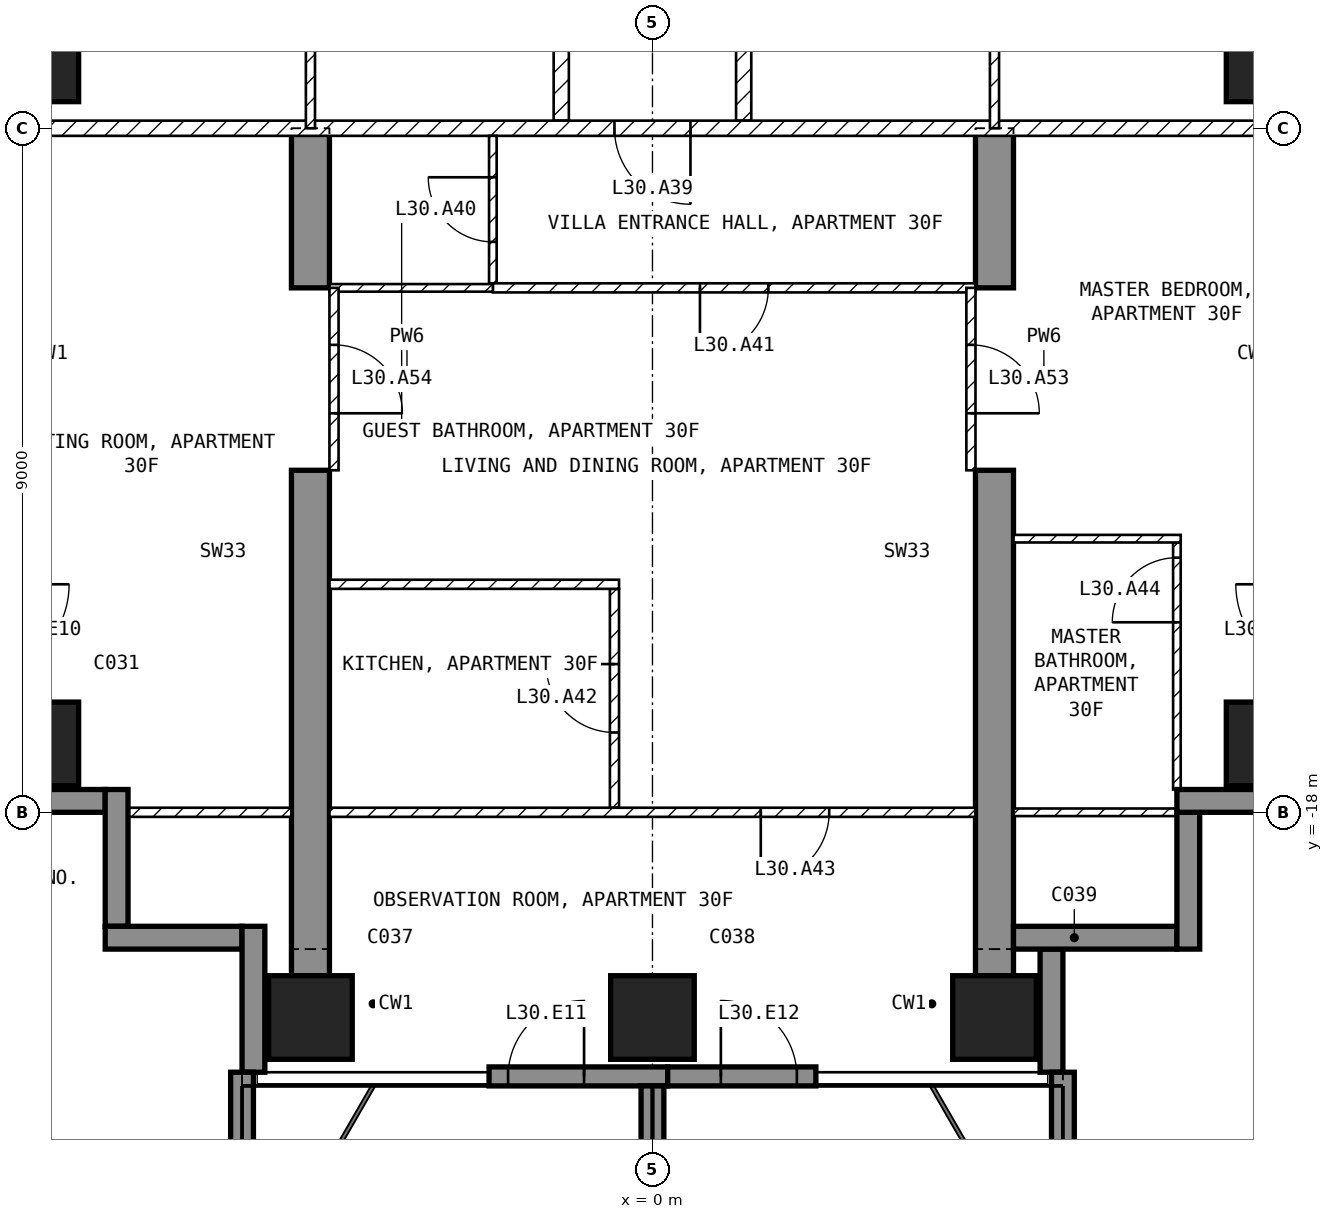
"""IFC4 building model, lengths in metres.
Left out: names, types, materials, properties, quantities, classifications, styles, units other than length and angle.
Written with IfcOpenShell. Run it as: python <this file> out.ifc"""

import sys

from ifc_helpers import new_model, si_unit, direction, frame, frame_2d, origin, origin_2d, place, context, subcontext, project, spatial, polyline, rectangle, outline, extrude, element, fill, save


model = new_model("IFC4")
c1 = context("Model", 3, precision=1e-05, world=origin(), true_north=direction((0.0, 1.0)))
c2 = subcontext(c1, "Body", "Model", "MODEL_VIEW")
j1 = project(units=[si_unit("LENGTHUNIT", "METRE"), si_unit("PLANEANGLEUNIT", "RADIAN")], contexts=[c1])
p1 = place(None, origin())
s1 = spatial("IfcSite", under=j1, at=p1, CompositionType="ELEMENT")
p2 = place(p1, origin())
s2 = spatial("IfcBuilding", under=s1, at=p2, CompositionType="ELEMENT")
p3 = place(p2, frame((0.0, 0.0, 126.9)))
s3 = spatial("IfcBuildingStorey", under=s2, at=p3, CompositionType="ELEMENT", Elevation=126.9)
for number, where, z_axis, x_axis in (
    (1, (-8.1, -17.1, -0.25), (0.0, 0.0, 1.0), (1.0, 0.0, 0.0)),
    (2, (-8.1, -8.1, -0.25), (0.0, 0.0, 1.0), (1.0, 0.0, 0.0)),
    (3, (-4.5, -20.7, -0.25), (0.0, 0.0, 1.0), (1.0, 0.0, 0.0)),
    (4, (0.0, -20.7, -0.25), (0.0, 0.0, 1.0), (1.0, 0.0, 0.0)),
    (5, (4.5, -20.7, -0.25), (0.0, 0.0, 1.0), (1.0, 0.0, 0.0)),
    (6, (8.1, -17.1, -0.25), (0.0, 0.0, 1.0), (1.0, 0.0, 0.0)),
    (7, (8.1, -8.1, -0.25), (0.0, 0.0, 1.0), (1.0, 0.0, 0.0)),
):
    element("IfcColumn", number, at=place(p3, frame(where, z_axis=z_axis, x_axis=x_axis)), inside=s3, PredefinedType="COLUMN", context=c2, shape_type="SweptSolid", body=[
        extrude(rectangle(XDim=1.1, YDim=1.1, at=origin_2d()), origin(), (0.0, 0.0, 1.0), 3.5),
    ])
for number, where, z_axis, x_axis in (
    (8, (-4.75, -20.15, -0.25), (1.0, 0.0, 0.0), (0.0, 1.0, 0.0)),
    (9, (4.25, -20.15, -0.25), (1.0, 0.0, 0.0), (0.0, 1.0, 0.0)),
):
    element("IfcWall", number, at=place(p3, frame(where, z_axis=z_axis, x_axis=x_axis)), inside=s3, PredefinedType="SHEAR", context=c2, shape_type="SweptSolid", body=[
        extrude(outline(polyline([(0.0, 0.0), (6.65, 0.0), (6.65, 2.65), (9.05, 2.65), (9.05, 0.0), (11.15, 0.0), (11.15, 3.5), (0.0, 3.5), (0.0, 0.0)])), origin(), (0.0, 0.0, 1.0), 0.5),
    ])
p4 = place(p3, frame((-2.15, -21.475, 0.0), z_axis=(0.0, 0.0, 1.0), x_axis=(1.0, 0.0, 0.0)))
e10 = element("IfcWall", 10, at=p4, inside=s3, PredefinedType="SOLIDWALL", context=c2, shape_type="SweptSolid", body=[
    extrude(rectangle(XDim=2.35, YDim=0.25, at=frame_2d((1.175, 0.0))), origin(), (0.0, 0.0, 1.0), 3.25),
])
p5 = place(p4, frame((0.25, 0.0, 0.0)))
e11 = element("IfcOpeningElement", 11, at=p5, cuts=e10, PredefinedType="OPENING", context=c2, shape_type="SweptSolid", body=[
    extrude(rectangle(XDim=1.0, YDim=2.4, at=frame_2d((0.5, 1.2))), frame((0.0, 0.135, 0.0), z_axis=(0.0, -1.0, 0.0), x_axis=(1.0, 0.0, 0.0)), (0.0, 0.0, 1.0), 0.27),
])
p6 = place(p3, frame((0.2, -21.475, 0.0), z_axis=(0.0, 0.0, 1.0), x_axis=(1.0, 0.0, 0.0)))
e12 = element("IfcWall", 12, at=p6, inside=s3, PredefinedType="SOLIDWALL", context=c2, shape_type="SweptSolid", body=[
    extrude(rectangle(XDim=1.95, YDim=0.25, at=frame_2d((0.975, 0.0))), origin(), (0.0, 0.0, 1.0), 3.25),
])
p7 = place(p6, frame((0.7, 0.0, 0.0)))
e13 = element("IfcOpeningElement", 13, at=p7, cuts=e12, PredefinedType="OPENING", context=c2, shape_type="SweptSolid", body=[
    extrude(rectangle(XDim=1.0, YDim=2.4, at=frame_2d((0.5, 1.2))), frame((0.0, 0.135, 0.0), z_axis=(0.0, -1.0, 0.0), x_axis=(1.0, 0.0, 0.0)), (0.0, 0.0, 1.0), 0.27),
])
p8 = place(p3, frame((5.25, -21.42, 0.0), z_axis=(0.0, 0.0, 1.0), x_axis=(0.0, 1.0, 0.0)))
e14 = element("IfcWall", 14, at=p8, inside=s3, PredefinedType="SOLIDWALL", context=c2, shape_type="SweptSolid", body=[
    extrude(rectangle(XDim=1.62, YDim=0.3, at=frame_2d((0.81, 0.0))), origin(), (0.0, 0.0, 1.0), 3.25),
])
p9 = place(p3, frame((4.75, -19.65, 0.0), z_axis=(0.0, 0.0, 1.0), x_axis=(1.0, 0.0, 0.0)))
e15 = element("IfcWall", 15, at=p9, inside=s3, PredefinedType="SOLIDWALL", context=c2, shape_type="SweptSolid", body=[
    extrude(rectangle(XDim=2.15, YDim=0.3, at=frame_2d((1.075, 0.0))), origin(), (0.0, 0.0, 1.0), 3.25),
])
p10 = place(p3, frame((7.05, -19.8, 0.0), z_axis=(0.0, 0.0, 1.0), x_axis=(0.0, 1.0, 0.0)))
e16 = element("IfcWall", 16, at=p10, inside=s3, PredefinedType="SOLIDWALL", context=c2, shape_type="SweptSolid", body=[
    extrude(rectangle(XDim=1.8, YDim=0.3, at=frame_2d((0.9, 0.0))), origin(), (0.0, 0.0, 1.0), 3.25),
])
p11 = place(p3, frame((6.9, -17.85, 0.0), z_axis=(0.0, 0.0, 1.0), x_axis=(1.0, 0.0, 0.0)))
e17 = element("IfcWall", 17, at=p11, inside=s3, PredefinedType="SOLIDWALL", context=c2, shape_type="SweptSolid", body=[
    extrude(rectangle(XDim=1.85, YDim=0.3, at=frame_2d((0.925, 0.0))), origin(), (0.0, 0.0, 1.0), 3.25),
])
p12 = place(p3, frame((-8.75, -17.85, 0.0), z_axis=(0.0, 0.0, 1.0), x_axis=(1.0, 0.0, 0.0)))
e18 = element("IfcWall", 18, at=p12, inside=s3, PredefinedType="SOLIDWALL", context=c2, shape_type="SweptSolid", body=[
    extrude(rectangle(XDim=1.55, YDim=0.3, at=frame_2d((0.775, 0.0))), origin(), (0.0, 0.0, 1.0), 3.25),
])
for number, where, z_axis, x_axis in (
    (19, (-7.05, -17.7, 0.0), (0.0, 0.0, 1.0), (0.0, -1.0, 0.0)),
    (20, (-7.2, -19.65, 0.0), (0.0, 0.0, 1.0), (1.0, 0.0, 0.0)),
):
    element("IfcWall", number, at=place(p3, frame(where, z_axis=z_axis, x_axis=x_axis)), inside=s3, PredefinedType="SOLIDWALL", context=c2, shape_type="SweptSolid", body=[
        extrude(rectangle(XDim=1.8, YDim=0.3, at=frame_2d((0.9, 0.0))), origin(), (0.0, 0.0, 1.0), 3.25),
    ])
p13 = place(p3, frame((-5.25, -19.5, 0.0), z_axis=(0.0, 0.0, 1.0), x_axis=(0.0, -1.0, 0.0)))
e21 = element("IfcWall", 21, at=p13, inside=s3, PredefinedType="SOLIDWALL", context=c2, shape_type="SweptSolid", body=[
    extrude(rectangle(XDim=1.92, YDim=0.3, at=frame_2d((0.96, 0.0))), origin(), (0.0, 0.0, 1.0), 3.25),
])
p14 = place(p3, frame((-5.4, -21.42, 0.0), z_axis=(0.0, 0.0, 1.0), x_axis=(0.0, -1.0, 0.0)))
e22 = element("IfcWall", 22, at=p14, inside=s3, PredefinedType="SOLIDWALL", context=c2, shape_type="SweptSolid", body=[
    extrude(rectangle(XDim=2.88, YDim=0.3, at=frame_2d((1.44, 0.0))), origin(), (0.0, 0.0, 1.0), 3.25),
])
p15 = place(p3, frame((0.0, -21.6, 0.0), z_axis=(0.0, 0.0, 1.0), x_axis=(0.0, -1.0, 0.0)))
e23 = element("IfcWall", 23, at=p15, inside=s3, PredefinedType="SOLIDWALL", context=c2, shape_type="SweptSolid", body=[
    extrude(rectangle(XDim=2.7, YDim=0.3, at=frame_2d((1.35, 0.0))), origin(), (0.0, 0.0, 1.0), 3.25),
])
p16 = place(p3, frame((5.4, -21.42, 0.0), z_axis=(0.0, 0.0, 1.0), x_axis=(0.0, -1.0, 0.0)))
e24 = element("IfcWall", 24, at=p16, inside=s3, PredefinedType="SOLIDWALL", context=c2, shape_type="SweptSolid", body=[
    extrude(rectangle(XDim=2.88, YDim=0.3, at=frame_2d((1.44, 0.0))), origin(), (0.0, 0.0, 1.0), 3.25),
])
for number, where, z_axis, x_axis in (
    (25, (1.2, -4.6, 0.0), (0.0, 0.0, 1.0), (0.0, -1.0, 0.0)),
    (26, (-1.2, -8.9, 0.0), (0.0, 0.0, 1.0), (0.0, 1.0, 0.0)),
):
    element("IfcWall", number, at=place(p3, frame(where, z_axis=z_axis, x_axis=x_axis)), inside=s3, PredefinedType="PARTITIONING", context=c2, shape_type="SweptSolid", body=[
        extrude(rectangle(XDim=4.3, YDim=0.2, at=frame_2d((2.15, 0.0))), origin(), (0.0, 0.0, 1.0), 3.25),
    ])
p17 = place(p3, frame((8.92, -9.0, 0.0), z_axis=(0.0, 0.0, 1.0), x_axis=(-1.0, 0.0, 0.0)))
e27 = element("IfcWall", 27, at=p17, inside=s3, PredefinedType="PARTITIONING", context=c2, shape_type="SweptSolid", body=[
    extrude(rectangle(XDim=17.84, YDim=0.2, at=frame_2d((8.92, 0.0))), origin(), (0.0, 0.0, 1.0), 3.25),
])
p18 = place(p17, frame((8.42, 0.0, 0.0)))
e28 = element("IfcOpeningElement", 28, at=p18, cuts=e27, PredefinedType="OPENING", context=c2, shape_type="SweptSolid", body=[
    extrude(rectangle(XDim=1.0, YDim=2.1, at=frame_2d((0.5, 1.05))), frame((0.0, 0.11, 0.0), z_axis=(0.0, -1.0, 0.0), x_axis=(1.0, 0.0, 0.0)), (0.0, 0.0, 1.0), 0.22),
])
p19 = place(p3, frame((4.5, -9.0, 0.0), z_axis=(0.0, 0.0, 1.0), x_axis=(0.0, 1.0, 0.0)))
e29 = element("IfcWall", 29, at=p19, inside=s3, PredefinedType="PARTITIONING", context=c2, shape_type="SweptSolid", body=[
    extrude(rectangle(XDim=4.5, YDim=0.12, at=frame_2d((2.25, 0.0))), origin(), (0.0, 0.0, 1.0), 3.25),
])
p20 = place(p19, frame((1.8, 0.0, 0.0)))
e30 = element("IfcOpeningElement", 30, at=p20, cuts=e29, PredefinedType="OPENING", context=c2, shape_type="SweptSolid", body=[
    extrude(rectangle(XDim=0.9, YDim=2.1, at=frame_2d((0.45, 1.05))), frame((0.0, 0.07, 0.0), z_axis=(0.0, -1.0, 0.0), x_axis=(1.0, 0.0, 0.0)), (0.0, 0.0, 1.0), 0.14),
])
p21 = place(p3, frame((-4.5, -4.5, 0.0), z_axis=(0.0, 0.0, 1.0), x_axis=(0.0, -1.0, 0.0)))
e31 = element("IfcWall", 31, at=p21, inside=s3, PredefinedType="PARTITIONING", context=c2, shape_type="SweptSolid", body=[
    extrude(rectangle(XDim=4.5, YDim=0.12, at=frame_2d((2.25, 0.0))), origin(), (0.0, 0.0, 1.0), 3.25),
])
p22 = place(p21, frame((1.8, 0.0, 0.0)))
e32 = element("IfcOpeningElement", 32, at=p22, cuts=e31, PredefinedType="OPENING", context=c2, shape_type="SweptSolid", body=[
    extrude(rectangle(XDim=0.9, YDim=2.1, at=frame_2d((0.45, 1.05))), frame((0.0, 0.07, 0.0), z_axis=(0.0, -1.0, 0.0), x_axis=(1.0, 0.0, 0.0)), (0.0, 0.0, 1.0), 0.14),
])
p23 = place(p3, frame((-2.1, -11.04, 0.0), z_axis=(0.0, 0.0, 1.0), x_axis=(0.0, 1.0, 0.0)))
e33 = element("IfcWall", 33, at=p23, inside=s3, PredefinedType="PARTITIONING", context=c2, shape_type="SweptSolid", body=[
    extrude(rectangle(XDim=1.94, YDim=0.1, at=frame_2d((0.97, 0.0))), origin(), (0.0, 0.0, 1.0), 3.25),
])
p24 = place(p23, frame((0.545, 0.0, 0.0)))
e34 = element("IfcOpeningElement", 34, at=p24, cuts=e33, PredefinedType="OPENING", context=c2, shape_type="SweptSolid", body=[
    extrude(rectangle(XDim=0.85, YDim=2.1, at=frame_2d((0.425, 1.05))), frame((0.0, 0.06, 0.0), z_axis=(0.0, -1.0, 0.0), x_axis=(1.0, 0.0, 0.0)), (0.0, 0.0, 1.0), 0.12),
])
p25 = place(p3, frame((4.25, -11.1, 0.0), z_axis=(0.0, 0.0, 1.0), x_axis=(-1.0, 0.0, 0.0)))
e35 = element("IfcWall", 35, at=p25, inside=s3, PredefinedType="PARTITIONING", context=c2, shape_type="SweptSolid", body=[
    extrude(rectangle(XDim=6.35, YDim=0.12, at=frame_2d((3.175, 0.0))), origin(), (0.0, 0.0, 1.0), 3.25),
])
p26 = place(p25, frame((2.725, 0.0, 0.0)))
e36 = element("IfcOpeningElement", 36, at=p26, cuts=e35, PredefinedType="OPENING", context=c2, shape_type="SweptSolid", body=[
    extrude(rectangle(XDim=0.9, YDim=2.1, at=frame_2d((0.45, 1.05))), frame((0.0, 0.07, 0.0), z_axis=(0.0, -1.0, 0.0), x_axis=(1.0, 0.0, 0.0)), (0.0, 0.0, 1.0), 0.14),
])
p27 = place(p3, frame((-2.1, -11.1, 0.0), z_axis=(0.0, 0.0, 1.0), x_axis=(-1.0, 0.0, 0.0)))
e37 = element("IfcWall", 37, at=p27, inside=s3, PredefinedType="PARTITIONING", context=c2, shape_type="SweptSolid", body=[
    extrude(rectangle(XDim=2.15, YDim=0.1, at=frame_2d((1.075, 0.0))), origin(), (0.0, 0.0, 1.0), 3.25),
])
p28 = place(p3, frame((-0.5, -17.94, 0.0), z_axis=(0.0, 0.0, 1.0), x_axis=(0.0, 1.0, 0.0)))
e38 = element("IfcWall", 38, at=p28, inside=s3, PredefinedType="PARTITIONING", context=c2, shape_type="SweptSolid", body=[
    extrude(rectangle(XDim=2.88, YDim=0.12, at=frame_2d((1.44, 0.0))), origin(), (0.0, 0.0, 1.0), 3.25),
])
p29 = place(p28, frame((0.99, 0.0, 0.0)))
e39 = element("IfcOpeningElement", 39, at=p29, cuts=e38, PredefinedType="OPENING", context=c2, shape_type="SweptSolid", body=[
    extrude(rectangle(XDim=0.9, YDim=2.1, at=frame_2d((0.45, 1.05))), frame((0.0, 0.07, 0.0), z_axis=(0.0, -1.0, 0.0), x_axis=(1.0, 0.0, 0.0)), (0.0, 0.0, 1.0), 0.14),
])
p30 = place(p3, frame((-0.44, -15.0, 0.0), z_axis=(0.0, 0.0, 1.0), x_axis=(-1.0, 0.0, 0.0)))
e40 = element("IfcWall", 40, at=p30, inside=s3, PredefinedType="PARTITIONING", context=c2, shape_type="SweptSolid", body=[
    extrude(rectangle(XDim=3.81, YDim=0.12, at=frame_2d((1.905, 0.0))), origin(), (0.0, 0.0, 1.0), 3.25),
])
p31 = place(p3, frame((4.25, -18.0, 0.0), z_axis=(0.0, 0.0, 1.0), x_axis=(-1.0, 0.0, 0.0)))
e41 = element("IfcWall", 41, at=p31, inside=s3, PredefinedType="PARTITIONING", context=c2, shape_type="SweptSolid", body=[
    extrude(rectangle(XDim=8.5, YDim=0.12, at=frame_2d((4.25, 0.0))), origin(), (0.0, 0.0, 1.0), 3.25),
])
p32 = place(p31, frame((1.925, 0.0, 0.0)))
e42 = element("IfcOpeningElement", 42, at=p32, cuts=e41, PredefinedType="OPENING", context=c2, shape_type="SweptSolid", body=[
    extrude(rectangle(XDim=0.9, YDim=2.1, at=frame_2d((0.45, 1.05))), frame((0.0, 0.07, 0.0), z_axis=(0.0, -1.0, 0.0), x_axis=(1.0, 0.0, 0.0)), (0.0, 0.0, 1.0), 0.14),
])
p33 = place(p3, frame((6.9, -17.7, 0.0), z_axis=(0.0, 0.0, 1.0), x_axis=(0.0, 1.0, 0.0)))
e43 = element("IfcWall", 43, at=p33, inside=s3, PredefinedType="PARTITIONING", context=c2, shape_type="SweptSolid", body=[
    extrude(rectangle(XDim=3.25, YDim=0.1, at=frame_2d((1.625, 0.0))), origin(), (0.0, 0.0, 1.0), 3.25),
])
p34 = place(p33, frame((2.2, 0.0, 0.0)))
e44 = element("IfcOpeningElement", 44, at=p34, cuts=e43, PredefinedType="OPENING", context=c2, shape_type="SweptSolid", body=[
    extrude(rectangle(XDim=0.85, YDim=2.1, at=frame_2d((0.425, 1.05))), frame((0.0, 0.06, 0.0), z_axis=(0.0, -1.0, 0.0), x_axis=(1.0, 0.0, 0.0)), (0.0, 0.0, 1.0), 0.12),
])
p35 = place(p3, frame((6.95, -14.4, 0.0), z_axis=(0.0, 0.0, 1.0), x_axis=(-1.0, 0.0, 0.0)))
e45 = element("IfcWall", 45, at=p35, inside=s3, PredefinedType="PARTITIONING", context=c2, shape_type="SweptSolid", body=[
    extrude(rectangle(XDim=2.2, YDim=0.1, at=frame_2d((1.1, 0.0))), origin(), (0.0, 0.0, 1.0), 3.25),
])
p36 = place(p3, frame((7.12, -18.0, 0.0), z_axis=(0.0, 0.0, 1.0), x_axis=(-1.0, 0.0, 0.0)))
e46 = element("IfcWall", 46, at=p36, inside=s3, PredefinedType="PARTITIONING", context=c2, shape_type="SweptSolid", body=[
    extrude(rectangle(XDim=2.37, YDim=0.1, at=frame_2d((1.185, 0.0))), origin(), (0.0, 0.0, 1.0), 3.25),
])
p37 = place(p3, frame((-4.75, -18.0, 0.0), z_axis=(0.0, 0.0, 1.0), x_axis=(-1.0, 0.0, 0.0)))
e47 = element("IfcWall", 47, at=p37, inside=s3, PredefinedType="PARTITIONING", context=c2, shape_type="SweptSolid", body=[
    extrude(rectangle(XDim=2.37, YDim=0.12, at=frame_2d((1.185, 0.0))), origin(), (0.0, 0.0, 1.0), 3.25),
])
p38 = place(p3, frame((4.19, -11.1, 0.0), z_axis=(0.0, 0.0, 1.0), x_axis=(0.0, -1.0, 0.0)))
e48 = element("IfcWall", 48, at=p38, inside=s3, PredefinedType="PARTITIONING", context=c2, shape_type="SweptSolid", body=[
    extrude(rectangle(XDim=2.4, YDim=0.12, at=frame_2d((1.2, 0.0))), origin(), (0.0, 0.0, 1.0), 2.4),
])
p39 = place(p38, frame((0.75, 0.0, 0.0)))
e49 = element("IfcOpeningElement", 49, at=p39, cuts=e48, PredefinedType="OPENING", context=c2, shape_type="SweptSolid", body=[
    extrude(rectangle(XDim=0.9, YDim=2.1, at=frame_2d((0.45, 1.05))), frame((0.0, 0.07, 0.0), z_axis=(0.0, -1.0, 0.0), x_axis=(1.0, 0.0, 0.0)), (0.0, 0.0, 1.0), 0.14),
])
p40 = place(p3, frame((-4.19, -11.1, 0.0), z_axis=(0.0, 0.0, 1.0), x_axis=(0.0, -1.0, 0.0)))
e50 = element("IfcWall", 50, at=p40, inside=s3, PredefinedType="PARTITIONING", context=c2, shape_type="SweptSolid", body=[
    extrude(rectangle(XDim=2.4, YDim=0.12, at=frame_2d((1.2, 0.0))), origin(), (0.0, 0.0, 1.0), 2.4),
])
p41 = place(p40, frame((0.75, 0.0, 0.0)))
e51 = element("IfcOpeningElement", 51, at=p41, cuts=e50, PredefinedType="OPENING", context=c2, shape_type="SweptSolid", body=[
    extrude(rectangle(XDim=0.9, YDim=2.1, at=frame_2d((0.45, 1.05))), frame((0.0, 0.07, 0.0), z_axis=(0.0, -1.0, 0.0), x_axis=(1.0, 0.0, 0.0)), (0.0, 0.0, 1.0), 0.14),
])
p42 = place(p5, origin())
e52 = element("IfcDoor", 52, at=p42, inside=s3, OperationType="SINGLE_SWING_RIGHT", PredefinedType="DOOR", context=c2, shape_type="SweptSolid", body=[
    extrude(rectangle(XDim=1.0, YDim=2.4, at=frame_2d((0.5, 1.2))), frame((0.0, 0.025, 0.0), z_axis=(0.0, -1.0, 0.0), x_axis=(1.0, 0.0, 0.0)), (0.0, 0.0, 1.0), 0.05),
])
fill(e11, e52)
p43 = place(p7, origin())
e53 = element("IfcDoor", 53, at=p43, inside=s3, OperationType="SINGLE_SWING_LEFT", PredefinedType="DOOR", context=c2, shape_type="SweptSolid", body=[
    extrude(rectangle(XDim=1.0, YDim=2.4, at=frame_2d((0.5, 1.2))), frame((0.0, 0.025, 0.0), z_axis=(0.0, -1.0, 0.0), x_axis=(1.0, 0.0, 0.0)), (0.0, 0.0, 1.0), 0.05),
])
fill(e13, e53)
p44 = place(p18, origin())
e54 = element("IfcDoor", 54, at=p44, inside=s3, OperationType="SINGLE_SWING_LEFT", PredefinedType="DOOR", context=c2, shape_type="SweptSolid", body=[
    extrude(rectangle(XDim=1.0, YDim=2.1, at=frame_2d((0.5, 1.05))), frame((0.0, 0.025, 0.0), z_axis=(0.0, -1.0, 0.0), x_axis=(1.0, 0.0, 0.0)), (0.0, 0.0, 1.0), 0.05),
])
fill(e28, e54)
p45 = place(p24, origin())
e55 = element("IfcDoor", 55, at=p45, inside=s3, OperationType="SINGLE_SWING_RIGHT", PredefinedType="DOOR", context=c2, shape_type="SweptSolid", body=[
    extrude(rectangle(XDim=0.85, YDim=2.1, at=frame_2d((0.425, 1.05))), frame((0.0, 0.025, 0.0), z_axis=(0.0, -1.0, 0.0), x_axis=(1.0, 0.0, 0.0)), (0.0, 0.0, 1.0), 0.05),
])
fill(e34, e55)
p46 = place(p26, origin())
e56 = element("IfcDoor", 56, at=p46, inside=s3, OperationType="SINGLE_SWING_RIGHT", PredefinedType="DOOR", context=c2, shape_type="SweptSolid", body=[
    extrude(rectangle(XDim=0.9, YDim=2.1, at=frame_2d((0.45, 1.05))), frame((0.0, 0.025, 0.0), z_axis=(0.0, -1.0, 0.0), x_axis=(1.0, 0.0, 0.0)), (0.0, 0.0, 1.0), 0.05),
])
fill(e36, e56)
p47 = place(p29, origin())
e57 = element("IfcDoor", 57, at=p47, inside=s3, OperationType="SINGLE_SWING_RIGHT", PredefinedType="DOOR", context=c2, shape_type="SweptSolid", body=[
    extrude(rectangle(XDim=0.9, YDim=2.1, at=frame_2d((0.45, 1.05))), frame((0.0, 0.025, 0.0), z_axis=(0.0, -1.0, 0.0), x_axis=(1.0, 0.0, 0.0)), (0.0, 0.0, 1.0), 0.05),
])
fill(e39, e57)
p48 = place(p32, origin())
e58 = element("IfcDoor", 58, at=p48, inside=s3, OperationType="SINGLE_SWING_RIGHT", PredefinedType="DOOR", context=c2, shape_type="SweptSolid", body=[
    extrude(rectangle(XDim=0.9, YDim=2.1, at=frame_2d((0.45, 1.05))), frame((0.0, 0.025, 0.0), z_axis=(0.0, -1.0, 0.0), x_axis=(1.0, 0.0, 0.0)), (0.0, 0.0, 1.0), 0.05),
])
fill(e42, e58)
p49 = place(p34, origin())
e59 = element("IfcDoor", 59, at=p49, inside=s3, OperationType="SINGLE_SWING_LEFT", PredefinedType="DOOR", context=c2, shape_type="SweptSolid", body=[
    extrude(rectangle(XDim=0.85, YDim=2.1, at=frame_2d((0.425, 1.05))), frame((0.0, 0.025, 0.0), z_axis=(0.0, -1.0, 0.0), x_axis=(1.0, 0.0, 0.0)), (0.0, 0.0, 1.0), 0.05),
])
fill(e44, e59)
p50 = place(p39, origin())
e60 = element("IfcDoor", 60, at=p50, inside=s3, OperationType="SINGLE_SWING_RIGHT", PredefinedType="DOOR", context=c2, shape_type="SweptSolid", body=[
    extrude(rectangle(XDim=0.9, YDim=2.1, at=frame_2d((0.45, 1.05))), frame((0.0, 0.025, 0.0), z_axis=(0.0, -1.0, 0.0), x_axis=(1.0, 0.0, 0.0)), (0.0, 0.0, 1.0), 0.05),
])
fill(e49, e60)
p51 = place(p41, origin())
e61 = element("IfcDoor", 61, at=p51, inside=s3, OperationType="SINGLE_SWING_RIGHT", PredefinedType="DOOR", context=c2, shape_type="SweptSolid", body=[
    extrude(rectangle(XDim=0.9, YDim=2.1, at=frame_2d((0.45, 1.05))), frame((0.0, 0.025, 0.0), z_axis=(0.0, -1.0, 0.0), x_axis=(1.0, 0.0, 0.0)), (0.0, 0.0, 1.0), 0.05),
])
fill(e51, e61)
save(model, sys.argv[1])
